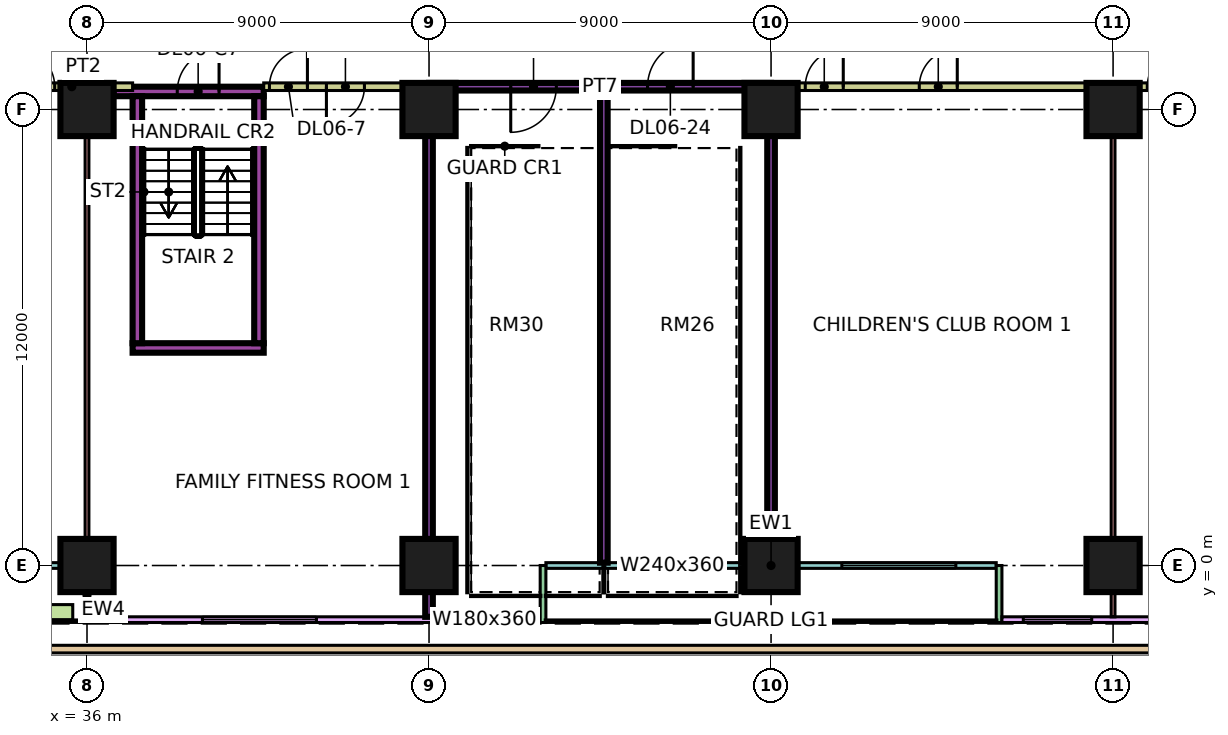
"""IFC4 building model, lengths in metres.
Left out: names, types, materials, properties, quantities, classifications, styles, units other than length and angle.
Written with IfcOpenShell. Run it as: python <this file> out.ifc"""

import sys

from ifc_helpers import new_model, si_unit, direction, frame, frame_2d, origin, origin_2d, place, context, subcontext, project, spatial, rectangle, extrude, element, fill, save


model = new_model("IFC4")
c1 = context("Model", 3, precision=1e-05, world=origin(), true_north=direction((0.0, 1.0)))
c2 = subcontext(c1, "Body", "Model", "MODEL_VIEW")
j1 = project(units=[si_unit("LENGTHUNIT", "METRE"), si_unit("PLANEANGLEUNIT", "RADIAN")], contexts=[c1])
p1 = place(None, origin())
s1 = spatial("IfcSite", under=j1, at=p1, CompositionType="ELEMENT")
p2 = place(p1, origin())
s2 = spatial("IfcBuilding", under=s1, at=p2, CompositionType="ELEMENT")
p3 = place(p2, frame((0.0, 0.0, 35.4)))
s3 = spatial("IfcBuildingStorey", under=s2, at=p3, CompositionType="ELEMENT", Elevation=35.4)
for number, where, z_axis, x_axis in (
    (1, (36.0, 0.0, 0.0), (0.0, 0.0, 1.0), (1.0, 0.0, 0.0)),
    (2, (36.0, 12.0, 0.0), (0.0, 0.0, 1.0), (1.0, 0.0, 0.0)),
    (3, (45.0, 0.0, 0.0), (0.0, 0.0, 1.0), (1.0, 0.0, 0.0)),
    (4, (45.0, 12.0, 0.0), (0.0, 0.0, 1.0), (1.0, 0.0, 0.0)),
    (5, (54.0, 0.0, 0.0), (0.0, 0.0, 1.0), (1.0, 0.0, 0.0)),
    (6, (54.0, 12.0, 0.0), (0.0, 0.0, 1.0), (1.0, 0.0, 0.0)),
    (7, (63.0, 0.0, 0.0), (0.0, 0.0, 1.0), (1.0, 0.0, 0.0)),
    (8, (63.0, 12.0, 0.0), (0.0, 0.0, 1.0), (1.0, 0.0, 0.0)),
):
    element("IfcColumn", number, at=place(p3, frame(where, z_axis=z_axis, x_axis=x_axis)), inside=s3, PredefinedType="COLUMN", context=c2, shape_type="SweptSolid", body=[
        extrude(rectangle(XDim=1.4, YDim=1.4, at=origin_2d()), origin(), (0.0, 0.0, 1.0), 6.0),
    ])
p4 = place(p3, frame((37.2, 5.725, 0.0), z_axis=(0.0, 0.0, 1.0), x_axis=(1.0, 0.0, 0.0)))
e9 = element("IfcWall", 9, at=p4, inside=s3, PredefinedType="SHEAR", context=c2, shape_type="SweptSolid", body=[
    extrude(rectangle(XDim=3.45, YDim=0.25, at=frame_2d((1.725, 0.0))), origin(), (0.0, 0.0, 1.0), 6.0),
])
p5 = place(p3, frame((36.7, 12.475, 0.0), z_axis=(0.0, 0.0, 1.0), x_axis=(1.0, 0.0, 0.0)))
e10 = element("IfcWall", 10, at=p5, inside=s3, PredefinedType="SHEAR", context=c2, shape_type="SweptSolid", body=[
    extrude(rectangle(XDim=3.95, YDim=0.25, at=frame_2d((1.975, 0.0))), origin(), (0.0, 0.0, 1.0), 6.0),
])
p6 = place(p5, frame((1.675, 0.0, 0.0)))
e11 = element("IfcOpeningElement", 11, at=p6, cuts=e10, PredefinedType="OPENING", context=c2, shape_type="SweptSolid", body=[
    extrude(rectangle(XDim=1.1, YDim=2.2, at=frame_2d((0.55, 1.1))), frame((0.0, 0.135, 0.0), z_axis=(0.0, -1.0, 0.0), x_axis=(1.0, 0.0, 0.0)), (0.0, 0.0, 1.0), 0.27),
])
for number, where, z_axis, x_axis in (
    (12, (37.325, 5.85, 0.0), (0.0, 0.0, 1.0), (0.0, 1.0, 0.0)),
    (13, (40.525, 5.85, 0.0), (0.0, 0.0, 1.0), (0.0, 1.0, 0.0)),
):
    element("IfcWall", number, at=place(p3, frame(where, z_axis=z_axis, x_axis=x_axis)), inside=s3, PredefinedType="SHEAR", context=c2, shape_type="SweptSolid", body=[
        extrude(rectangle(XDim=6.5, YDim=0.25, at=frame_2d((3.25, 0.0))), origin(), (0.0, 0.0, 1.0), 6.0),
    ])
p7 = place(p3, frame((24.075, 0.0, 0.0), z_axis=(0.0, 0.0, 1.0), x_axis=(1.0, 0.0, 0.0)))
e14 = element("IfcWall", 14, at=p7, inside=s3, PredefinedType="SOLIDWALL", context=c2, shape_type="SweptSolid", body=[
    extrude(rectangle(XDim=11.85, YDim=0.15, at=frame_2d((5.925, 0.0))), origin(), (0.0, 0.0, 1.0), 5.6),
])
p8 = place(p7, frame((4.425, 0.0, 0.45)))
e15 = element("IfcOpeningElement", 15, at=p8, cuts=e14, PredefinedType="OPENING", context=c2, shape_type="SweptSolid", body=[
    extrude(rectangle(XDim=3.0, YDim=3.6, at=frame_2d((1.5, 1.8))), frame((0.0, 0.085, 0.0), z_axis=(0.0, -1.0, 0.0), x_axis=(1.0, 0.0, 0.0)), (0.0, 0.0, 1.0), 0.17),
])
p9 = place(p3, frame((36.0, -1.5, 0.0), z_axis=(0.0, 0.0, 1.0), x_axis=(0.0, 1.0, 0.0)))
e16 = element("IfcWall", 16, at=p9, inside=s3, PredefinedType="SOLIDWALL", context=c2, shape_type="SweptSolid", body=[
    extrude(rectangle(XDim=1.5, YDim=0.15, at=frame_2d((0.75, 0.0))), origin(), (0.0, 0.0, 1.0), 5.6),
])
p10 = place(p3, frame((36.075, -1.425, 0.0), z_axis=(0.0, 0.0, 1.0), x_axis=(1.0, 0.0, 0.0)))
e17 = element("IfcWall", 17, at=p10, inside=s3, PredefinedType="SOLIDWALL", context=c2, shape_type="SweptSolid", body=[
    extrude(rectangle(XDim=11.85, YDim=0.15, at=frame_2d((5.925, 0.0))), origin(), (0.0, 0.0, 1.0), 5.6),
])
p11 = place(p10, frame((2.962, 0.0, 0.45)))
e18 = element("IfcOpeningElement", 18, at=p11, cuts=e17, PredefinedType="OPENING", context=c2, shape_type="SweptSolid", body=[
    extrude(rectangle(XDim=3.0, YDim=3.6, at=frame_2d((1.5, 1.8))), frame((0.0, 0.085, 0.0), z_axis=(0.0, -1.0, 0.0), x_axis=(1.0, 0.0, 0.0)), (0.0, 0.0, 1.0), 0.17),
])
p12 = place(p10, frame((9.488, 0.0, 0.45)))
e19 = element("IfcOpeningElement", 19, at=p12, cuts=e17, PredefinedType="OPENING", context=c2, shape_type="SweptSolid", body=[
    extrude(rectangle(XDim=1.8, YDim=3.6, at=frame_2d((0.9, 1.8))), frame((0.0, 0.085, 0.0), z_axis=(0.0, -1.0, 0.0), x_axis=(1.0, 0.0, 0.0)), (0.0, 0.0, 1.0), 0.17),
])
p13 = place(p3, frame((48.075, 0.0, 0.0), z_axis=(0.0, 0.0, 1.0), x_axis=(1.0, 0.0, 0.0)))
e20 = element("IfcWall", 20, at=p13, inside=s3, PredefinedType="SOLIDWALL", context=c2, shape_type="SweptSolid", body=[
    extrude(rectangle(XDim=11.85, YDim=0.15, at=frame_2d((5.925, 0.0))), origin(), (0.0, 0.0, 1.0), 5.6),
])
p14 = place(p13, frame((2.125, 0.0, 0.45)))
e21 = element("IfcOpeningElement", 21, at=p14, cuts=e20, PredefinedType="OPENING", context=c2, shape_type="SweptSolid", body=[
    extrude(rectangle(XDim=2.4, YDim=3.6, at=frame_2d((1.2, 1.8))), frame((0.0, 0.085, 0.0), z_axis=(0.0, -1.0, 0.0), x_axis=(1.0, 0.0, 0.0)), (0.0, 0.0, 1.0), 0.17),
])
p15 = place(p13, frame((7.788, 0.0, 0.45)))
e22 = element("IfcOpeningElement", 22, at=p15, cuts=e20, PredefinedType="OPENING", context=c2, shape_type="SweptSolid", body=[
    extrude(rectangle(XDim=3.0, YDim=3.6, at=frame_2d((1.5, 1.8))), frame((0.0, 0.085, 0.0), z_axis=(0.0, -1.0, 0.0), x_axis=(1.0, 0.0, 0.0)), (0.0, 0.0, 1.0), 0.17),
])
for number, where, z_axis, x_axis in (
    (23, (48.0, -1.5, 0.0), (0.0, 0.0, 1.0), (0.0, 1.0, 0.0)),
    (24, (60.0, -1.5, 0.0), (0.0, 0.0, 1.0), (0.0, 1.0, 0.0)),
):
    element("IfcWall", number, at=place(p3, frame(where, z_axis=z_axis, x_axis=x_axis)), inside=s3, PredefinedType="SOLIDWALL", context=c2, shape_type="SweptSolid", body=[
        extrude(rectangle(XDim=1.5, YDim=0.15, at=frame_2d((0.75, 0.0))), origin(), (0.0, 0.0, 1.0), 5.6),
    ])
p16 = place(p3, frame((60.075, -1.425, 0.0), z_axis=(0.0, 0.0, 1.0), x_axis=(1.0, 0.0, 0.0)))
e25 = element("IfcWall", 25, at=p16, inside=s3, PredefinedType="SOLIDWALL", context=c2, shape_type="SweptSolid", body=[
    extrude(rectangle(XDim=10.425, YDim=0.15, at=frame_2d((5.212, 0.0))), origin(), (0.0, 0.0, 1.0), 5.6),
])
p17 = place(p16, frame((0.562, 0.0, 0.45)))
e26 = element("IfcOpeningElement", 26, at=p17, cuts=e25, PredefinedType="OPENING", context=c2, shape_type="SweptSolid", body=[
    extrude(rectangle(XDim=1.8, YDim=3.6, at=frame_2d((0.9, 1.8))), frame((0.0, 0.085, 0.0), z_axis=(0.0, -1.0, 0.0), x_axis=(1.0, 0.0, 0.0)), (0.0, 0.0, 1.0), 0.17),
])
p18 = place(p16, frame((5.175, 0.0, 0.45)))
e27 = element("IfcOpeningElement", 27, at=p18, cuts=e25, PredefinedType="OPENING", context=c2, shape_type="SweptSolid", body=[
    extrude(rectangle(XDim=3.0, YDim=3.6, at=frame_2d((1.5, 1.8))), frame((0.0, 0.085, 0.0), z_axis=(0.0, -1.0, 0.0), x_axis=(1.0, 0.0, 0.0)), (0.0, 0.0, 1.0), 0.17),
])
p19 = place(p3, frame((24.375, -1.229, 0.0), z_axis=(0.0, 0.0, 1.0), x_axis=(1.0, 0.0, 0.0)))
e28 = element("IfcWall", 28, at=p19, inside=s3, PredefinedType="SOLIDWALL", context=c2, shape_type="SweptSolid", body=[
    extrude(rectangle(XDim=11.25, YDim=0.4, at=frame_2d((5.625, 0.0))), origin(), (0.0, 0.0, 1.0), 0.7),
])
p20 = place(p3, frame((70.79, -2.2, 0.0), z_axis=(0.0, 0.0, 1.0), x_axis=(-1.0, 0.0, 0.0)))
e29 = element("IfcWall", 29, at=p20, inside=s3, PredefinedType="PARAPET", context=c2, shape_type="SweptSolid", body=[
    extrude(rectangle(XDim=58.58, YDim=0.2, at=frame_2d((29.29, 0.0))), origin(), (0.0, 0.0, 1.0), 0.5),
])
p21 = place(p3, frame((34.0, 12.6, 0.0), z_axis=(0.0, 0.0, 1.0), x_axis=(1.0, 0.0, 0.0)))
e30 = element("IfcWall", 30, at=p21, inside=s3, PredefinedType="PARTITIONING", context=c2, shape_type="SweptSolid", body=[
    extrude(rectangle(XDim=3.2, YDim=0.2, at=frame_2d((1.6, 0.0))), origin(), (0.0, 0.0, 1.0), 5.6),
])
p22 = place(p21, frame((0.15, 0.0, 0.0)))
e31 = element("IfcOpeningElement", 31, at=p22, cuts=e30, PredefinedType="OPENING", context=c2, shape_type="SweptSolid", body=[
    extrude(rectangle(XDim=1.0, YDim=2.1, at=frame_2d((0.5, 1.05))), frame((0.0, 0.11, 0.0), z_axis=(0.0, -1.0, 0.0), x_axis=(1.0, 0.0, 0.0)), (0.0, 0.0, 1.0), 0.22),
])
p23 = place(p3, frame((36.0, 0.0, 0.0), z_axis=(0.0, 0.0, 1.0), x_axis=(0.0, 1.0, 0.0)))
e32 = element("IfcWall", 32, at=p23, inside=s3, PredefinedType="PARTITIONING", context=c2, shape_type="SweptSolid", body=[
    extrude(rectangle(XDim=12.5, YDim=0.1, at=frame_2d((6.25, 0.0))), origin(), (0.0, 0.0, 1.0), 5.6),
])
p24 = place(p3, frame((40.65, 12.6, 0.0), z_axis=(0.0, 0.0, 1.0), x_axis=(1.0, 0.0, 0.0)))
e33 = element("IfcWall", 33, at=p24, inside=s3, PredefinedType="PARTITIONING", context=c2, shape_type="SweptSolid", body=[
    extrude(rectangle(XDim=4.35, YDim=0.2, at=frame_2d((2.175, 0.0))), origin(), (0.0, 0.0, 1.0), 5.6),
])
p25 = place(p24, frame((1.65, 0.0, 0.0)))
e34 = element("IfcOpeningElement", 34, at=p25, cuts=e33, PredefinedType="OPENING", context=c2, shape_type="SweptSolid", body=[
    extrude(rectangle(XDim=1.0, YDim=2.1, at=frame_2d((0.5, 1.05))), frame((0.0, 0.11, 0.0), z_axis=(0.0, -1.0, 0.0), x_axis=(1.0, 0.0, 0.0)), (0.0, 0.0, 1.0), 0.22),
])
p26 = place(p24, frame((0.15, 0.0, 0.0)))
e35 = element("IfcOpeningElement", 35, at=p26, cuts=e33, PredefinedType="OPENING", context=c2, shape_type="SweptSolid", body=[
    extrude(rectangle(XDim=1.0, YDim=2.1, at=frame_2d((0.5, 1.05))), frame((0.0, 0.11, 0.0), z_axis=(0.0, -1.0, 0.0), x_axis=(1.0, 0.0, 0.0)), (0.0, 0.0, 1.0), 0.22),
])
p27 = place(p3, frame((45.0, -1.351, 0.0), z_axis=(0.0, 0.0, 1.0), x_axis=(0.0, 1.0, 0.0)))
e36 = element("IfcWall", 36, at=p27, inside=s3, PredefinedType="SOLIDWALL", context=c2, shape_type="SweptSolid", body=[
    extrude(rectangle(XDim=13.851, YDim=0.2, at=frame_2d((6.926, 0.0))), origin(), (0.0, 0.0, 1.0), 5.6),
])
p28 = place(p3, frame((45.0, 12.6, 0.0), z_axis=(0.0, 0.0, 1.0), x_axis=(1.0, 0.0, 0.0)))
e37 = element("IfcWall", 37, at=p28, inside=s3, PredefinedType="SOLIDWALL", context=c2, shape_type="SweptSolid", body=[
    extrude(rectangle(XDim=9.0, YDim=0.2, at=frame_2d((4.5, 0.0))), origin(), (0.0, 0.0, 1.0), 5.6),
])
p29 = place(p28, frame((5.75, 0.0, 0.0)))
e38 = element("IfcOpeningElement", 38, at=p29, cuts=e37, PredefinedType="OPENING", context=c2, shape_type="SweptSolid", body=[
    extrude(rectangle(XDim=1.2, YDim=2.1, at=frame_2d((0.6, 1.05))), frame((0.0, 0.11, 0.0), z_axis=(0.0, -1.0, 0.0), x_axis=(1.0, 0.0, 0.0)), (0.0, 0.0, 1.0), 0.22),
])
p30 = place(p28, frame((2.15, 0.0, 0.0)))
e39 = element("IfcOpeningElement", 39, at=p30, cuts=e37, PredefinedType="OPENING", context=c2, shape_type="SweptSolid", body=[
    extrude(rectangle(XDim=1.2, YDim=2.1, at=frame_2d((0.6, 1.05))), frame((0.0, 0.11, 0.0), z_axis=(0.0, -1.0, 0.0), x_axis=(1.0, 0.0, 0.0)), (0.0, 0.0, 1.0), 0.22),
])
for number, where, z_axis, x_axis in (
    (40, (49.6, 0.074, 0.0), (0.0, 0.0, 1.0), (0.0, 1.0, 0.0)),
    (41, (54.0, 0.074, 0.0), (0.0, 0.0, 1.0), (0.0, 1.0, 0.0)),
):
    element("IfcWall", number, at=place(p3, frame(where, z_axis=z_axis, x_axis=x_axis)), inside=s3, PredefinedType="SOLIDWALL", context=c2, shape_type="SweptSolid", body=[
        extrude(rectangle(XDim=12.426, YDim=0.2, at=frame_2d((6.213, 0.0))), origin(), (0.0, 0.0, 1.0), 5.6),
    ])
p31 = place(p3, frame((54.0, 12.6, 0.0), z_axis=(0.0, 0.0, 1.0), x_axis=(1.0, 0.0, 0.0)))
e42 = element("IfcWall", 42, at=p31, inside=s3, PredefinedType="PARTITIONING", context=c2, shape_type="SweptSolid", body=[
    extrude(rectangle(XDim=18.8, YDim=0.2, at=frame_2d((9.4, 0.0))), origin(), (0.0, 0.0, 1.0), 5.6),
])
p32 = place(p31, frame((3.9, 0.0, 0.0)))
e43 = element("IfcOpeningElement", 43, at=p32, cuts=e42, PredefinedType="OPENING", context=c2, shape_type="SweptSolid", body=[
    extrude(rectangle(XDim=1.0, YDim=2.1, at=frame_2d((0.5, 1.05))), frame((0.0, 0.11, 0.0), z_axis=(0.0, -1.0, 0.0), x_axis=(1.0, 0.0, 0.0)), (0.0, 0.0, 1.0), 0.22),
])
p33 = place(p31, frame((0.9, 0.0, 0.0)))
e44 = element("IfcOpeningElement", 44, at=p33, cuts=e42, PredefinedType="OPENING", context=c2, shape_type="SweptSolid", body=[
    extrude(rectangle(XDim=1.0, YDim=2.1, at=frame_2d((0.5, 1.05))), frame((0.0, 0.11, 0.0), z_axis=(0.0, -1.0, 0.0), x_axis=(1.0, 0.0, 0.0)), (0.0, 0.0, 1.0), 0.22),
])
p34 = place(p31, frame((12.9, 0.0, 0.0)))
e45 = element("IfcOpeningElement", 45, at=p34, cuts=e42, PredefinedType="OPENING", context=c2, shape_type="SweptSolid", body=[
    extrude(rectangle(XDim=1.0, YDim=2.1, at=frame_2d((0.5, 1.05))), frame((0.0, 0.11, 0.0), z_axis=(0.0, -1.0, 0.0), x_axis=(1.0, 0.0, 0.0)), (0.0, 0.0, 1.0), 0.22),
])
p35 = place(p31, frame((9.9, 0.0, 0.0)))
e46 = element("IfcOpeningElement", 46, at=p35, cuts=e42, PredefinedType="OPENING", context=c2, shape_type="SweptSolid", body=[
    extrude(rectangle(XDim=1.0, YDim=2.1, at=frame_2d((0.5, 1.05))), frame((0.0, 0.11, 0.0), z_axis=(0.0, -1.0, 0.0), x_axis=(1.0, 0.0, 0.0)), (0.0, 0.0, 1.0), 0.22),
])
p36 = place(p3, frame((63.0, -1.351, 0.0), z_axis=(0.0, 0.0, 1.0), x_axis=(0.0, 1.0, 0.0)))
e47 = element("IfcWall", 47, at=p36, inside=s3, PredefinedType="PARTITIONING", context=c2, shape_type="SweptSolid", body=[
    extrude(rectangle(XDim=13.851, YDim=0.1, at=frame_2d((6.926, 0.0))), origin(), (0.0, 0.0, 1.0), 5.6),
])
p37 = place(p11, origin())
e48 = element("IfcWindow", 48, at=p37, inside=s3, PartitioningType="SINGLE_PANEL", PredefinedType="WINDOW", context=c2, shape_type="SweptSolid", body=[
    extrude(rectangle(XDim=3.0, YDim=3.6, at=frame_2d((1.5, 1.8))), frame((0.0, 0.03, 0.0), z_axis=(0.0, -1.0, 0.0), x_axis=(1.0, 0.0, 0.0)), (0.0, 0.0, 1.0), 0.06),
])
fill(e18, e48)
p38 = place(p12, origin())
e49 = element("IfcWindow", 49, at=p38, inside=s3, PartitioningType="SINGLE_PANEL", PredefinedType="WINDOW", context=c2, shape_type="SweptSolid", body=[
    extrude(rectangle(XDim=1.8, YDim=3.6, at=frame_2d((0.9, 1.8))), frame((0.0, 0.03, 0.0), z_axis=(0.0, -1.0, 0.0), x_axis=(1.0, 0.0, 0.0)), (0.0, 0.0, 1.0), 0.06),
])
fill(e19, e49)
p39 = place(p14, origin())
e50 = element("IfcWindow", 50, at=p39, inside=s3, PartitioningType="SINGLE_PANEL", PredefinedType="WINDOW", context=c2, shape_type="SweptSolid", body=[
    extrude(rectangle(XDim=2.4, YDim=3.6, at=frame_2d((1.2, 1.8))), frame((0.0, 0.03, 0.0), z_axis=(0.0, -1.0, 0.0), x_axis=(1.0, 0.0, 0.0)), (0.0, 0.0, 1.0), 0.06),
])
fill(e21, e50)
p40 = place(p15, origin())
e51 = element("IfcWindow", 51, at=p40, inside=s3, PartitioningType="SINGLE_PANEL", PredefinedType="WINDOW", context=c2, shape_type="SweptSolid", body=[
    extrude(rectangle(XDim=3.0, YDim=3.6, at=frame_2d((1.5, 1.8))), frame((0.0, 0.03, 0.0), z_axis=(0.0, -1.0, 0.0), x_axis=(1.0, 0.0, 0.0)), (0.0, 0.0, 1.0), 0.06),
])
fill(e22, e51)
p41 = place(p17, origin())
e52 = element("IfcWindow", 52, at=p41, inside=s3, PartitioningType="SINGLE_PANEL", PredefinedType="WINDOW", context=c2, shape_type="SweptSolid", body=[
    extrude(rectangle(XDim=1.8, YDim=3.6, at=frame_2d((0.9, 1.8))), frame((0.0, 0.03, 0.0), z_axis=(0.0, -1.0, 0.0), x_axis=(1.0, 0.0, 0.0)), (0.0, 0.0, 1.0), 0.06),
])
fill(e26, e52)
p42 = place(p6, frame((1.1, 0.0, 0.0), z_axis=(0.0, 0.0, 1.0), x_axis=(-1.0, 0.0, 0.0)))
e53 = element("IfcDoor", 53, at=p42, inside=s3, OperationType="SINGLE_SWING_RIGHT", PredefinedType="DOOR", context=c2, shape_type="SweptSolid", body=[
    extrude(rectangle(XDim=1.1, YDim=2.2, at=frame_2d((0.55, 1.1))), frame((0.0, 0.025, 0.0), z_axis=(0.0, -1.0, 0.0), x_axis=(1.0, 0.0, 0.0)), (0.0, 0.0, 1.0), 0.05),
])
fill(e11, e53)
p43 = place(p25, frame((1.0, 0.0, 0.0), z_axis=(0.0, 0.0, 1.0), x_axis=(-1.0, 0.0, 0.0)))
e54 = element("IfcDoor", 54, at=p43, inside=s3, OperationType="SINGLE_SWING_LEFT", PredefinedType="DOOR", context=c2, shape_type="SweptSolid", body=[
    extrude(rectangle(XDim=1.0, YDim=2.1, at=frame_2d((0.5, 1.05))), frame((0.0, 0.025, 0.0), z_axis=(0.0, -1.0, 0.0), x_axis=(1.0, 0.0, 0.0)), (0.0, 0.0, 1.0), 0.05),
])
fill(e34, e54)
p44 = place(p26, frame((1.0, 0.0, 0.0), z_axis=(0.0, 0.0, 1.0), x_axis=(-1.0, 0.0, 0.0)))
e55 = element("IfcDoor", 55, at=p44, inside=s3, OperationType="SINGLE_SWING_RIGHT", PredefinedType="DOOR", context=c2, shape_type="SweptSolid", body=[
    extrude(rectangle(XDim=1.0, YDim=2.1, at=frame_2d((0.5, 1.05))), frame((0.0, 0.025, 0.0), z_axis=(0.0, -1.0, 0.0), x_axis=(1.0, 0.0, 0.0)), (0.0, 0.0, 1.0), 0.05),
])
fill(e35, e55)
p45 = place(p32, frame((1.0, 0.0, 0.0), z_axis=(0.0, 0.0, 1.0), x_axis=(-1.0, 0.0, 0.0)))
e56 = element("IfcDoor", 56, at=p45, inside=s3, OperationType="SINGLE_SWING_RIGHT", PredefinedType="DOOR", context=c2, shape_type="SweptSolid", body=[
    extrude(rectangle(XDim=1.0, YDim=2.1, at=frame_2d((0.5, 1.05))), frame((0.0, 0.025, 0.0), z_axis=(0.0, -1.0, 0.0), x_axis=(1.0, 0.0, 0.0)), (0.0, 0.0, 1.0), 0.05),
])
fill(e43, e56)
p46 = place(p33, frame((1.0, 0.0, 0.0), z_axis=(0.0, 0.0, 1.0), x_axis=(-1.0, 0.0, 0.0)))
e57 = element("IfcDoor", 57, at=p46, inside=s3, OperationType="SINGLE_SWING_RIGHT", PredefinedType="DOOR", context=c2, shape_type="SweptSolid", body=[
    extrude(rectangle(XDim=1.0, YDim=2.1, at=frame_2d((0.5, 1.05))), frame((0.0, 0.025, 0.0), z_axis=(0.0, -1.0, 0.0), x_axis=(1.0, 0.0, 0.0)), (0.0, 0.0, 1.0), 0.05),
])
fill(e44, e57)
p47 = place(p35, frame((1.0, 0.0, 0.0), z_axis=(0.0, 0.0, 1.0), x_axis=(-1.0, 0.0, 0.0)))
e58 = element("IfcDoor", 58, at=p47, inside=s3, OperationType="SINGLE_SWING_RIGHT", PredefinedType="DOOR", context=c2, shape_type="SweptSolid", body=[
    extrude(rectangle(XDim=1.0, YDim=2.1, at=frame_2d((0.5, 1.05))), frame((0.0, 0.025, 0.0), z_axis=(0.0, -1.0, 0.0), x_axis=(1.0, 0.0, 0.0)), (0.0, 0.0, 1.0), 0.05),
])
fill(e46, e58)
p48 = place(p22, origin())
e59 = element("IfcDoor", 59, at=p48, inside=s3, OperationType="SINGLE_SWING_LEFT", PredefinedType="DOOR", context=c2, shape_type="SweptSolid", body=[
    extrude(rectangle(XDim=1.0, YDim=2.1, at=frame_2d((0.5, 1.05))), frame((0.0, 0.025, 0.0), z_axis=(0.0, -1.0, 0.0), x_axis=(1.0, 0.0, 0.0)), (0.0, 0.0, 1.0), 0.05),
])
fill(e31, e59)
p49 = place(p29, frame((1.2, 0.0, 0.0), z_axis=(0.0, 0.0, 1.0), x_axis=(-1.0, 0.0, 0.0)))
e60 = element("IfcDoor", 60, at=p49, inside=s3, OperationType="SINGLE_SWING_RIGHT", PredefinedType="DOOR", context=c2, shape_type="SweptSolid", body=[
    extrude(rectangle(XDim=1.2, YDim=2.1, at=frame_2d((0.6, 1.05))), frame((0.0, 0.025, 0.0), z_axis=(0.0, -1.0, 0.0), x_axis=(1.0, 0.0, 0.0)), (0.0, 0.0, 1.0), 0.05),
])
fill(e38, e60)
p50 = place(p30, frame((1.2, 0.0, 0.0), z_axis=(0.0, 0.0, 1.0), x_axis=(-1.0, 0.0, 0.0)))
e61 = element("IfcDoor", 61, at=p50, inside=s3, OperationType="SINGLE_SWING_LEFT", PredefinedType="DOOR", context=c2, shape_type="SweptSolid", body=[
    extrude(rectangle(XDim=1.2, YDim=2.1, at=frame_2d((0.6, 1.05))), frame((0.0, 0.025, 0.0), z_axis=(0.0, -1.0, 0.0), x_axis=(1.0, 0.0, 0.0)), (0.0, 0.0, 1.0), 0.05),
])
fill(e39, e61)
save(model, sys.argv[1])
